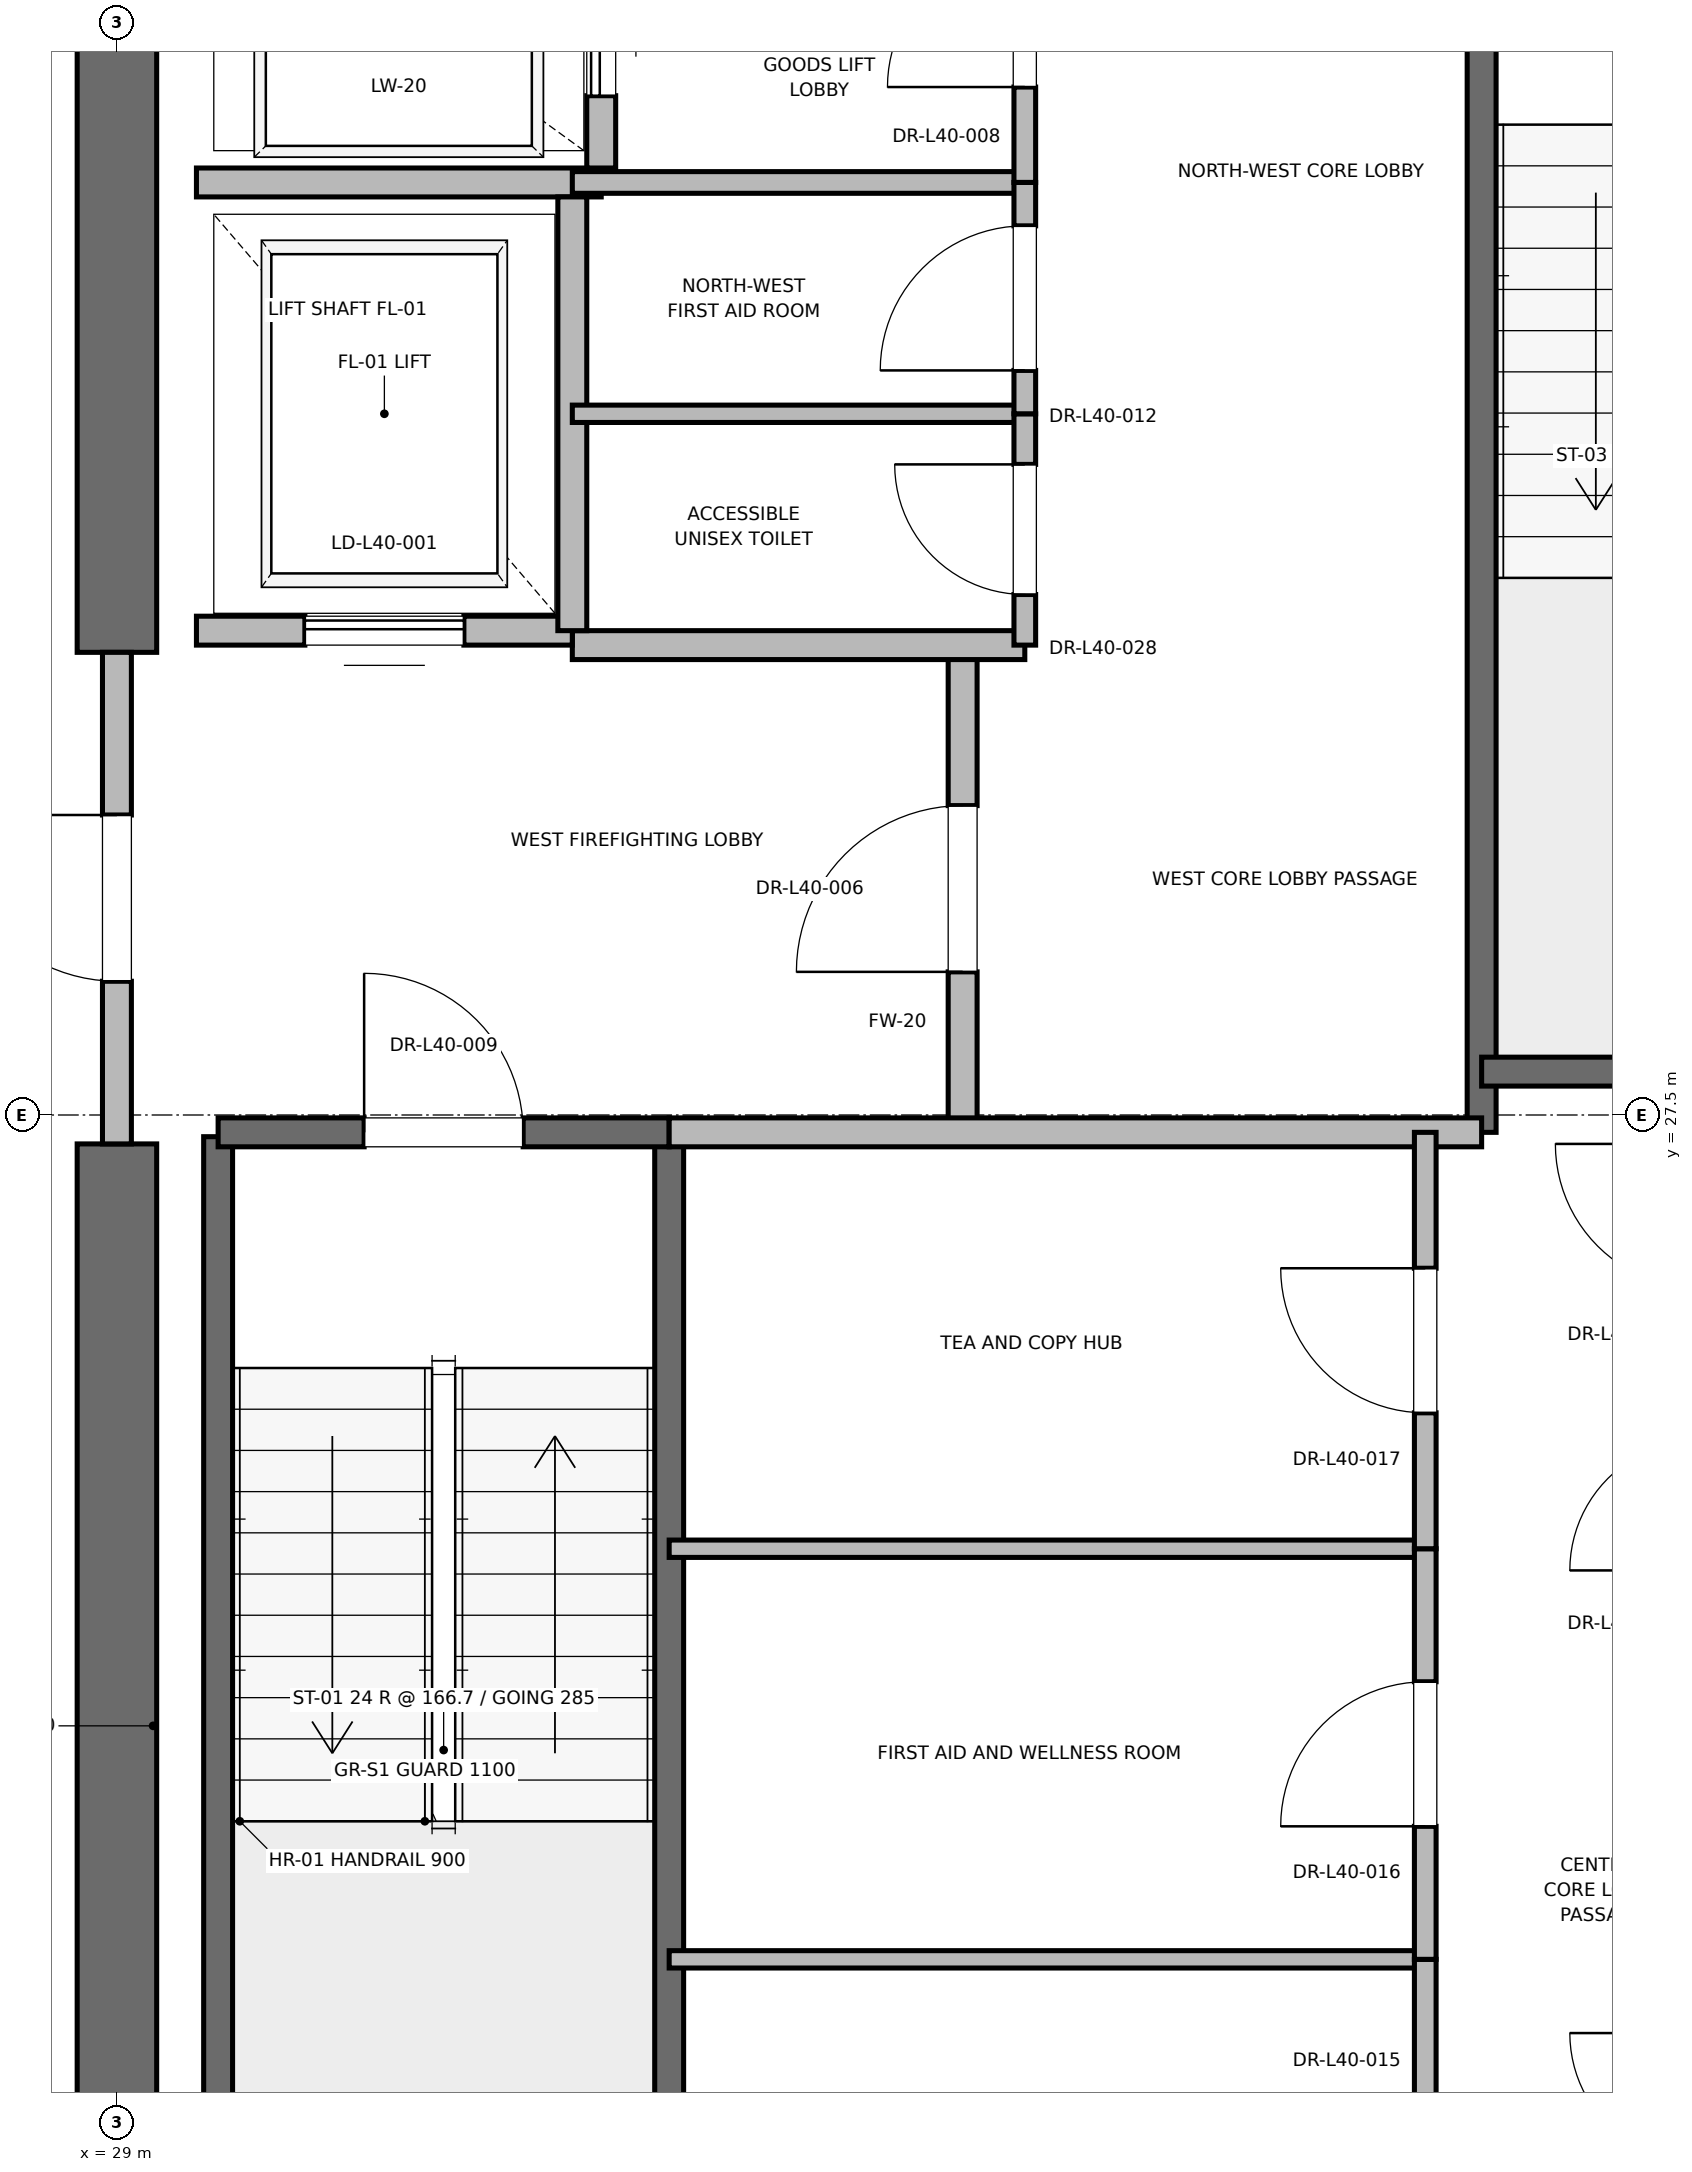
"""IFC4 building model, lengths in metres.
Left out: names, types, materials, properties, quantities, classifications, styles, units other than length and angle.
Written with IfcOpenShell. Run it as: python <this file> out.ifc"""

import sys

from ifc_helpers import new_model, si_unit, direction, frame, frame_2d, origin, place, context, subcontext, project, spatial, rectangle, extrude, element, fill, save


model = new_model("IFC4")
c1 = context("Model", 3, precision=1e-05, world=origin(), true_north=direction((0.0, 1.0)))
c2 = subcontext(c1, "Body", "Model", "MODEL_VIEW")
j1 = project(units=[si_unit("LENGTHUNIT", "METRE"), si_unit("PLANEANGLEUNIT", "RADIAN")], contexts=[c1])
p1 = place(None, origin())
s1 = spatial("IfcSite", under=j1, at=p1, CompositionType="ELEMENT")
p2 = place(p1, origin())
s2 = spatial("IfcBuilding", under=s1, at=p2, CompositionType="ELEMENT")
p3 = place(p2, frame((0.0, 0.0, 172.4)))
s3 = spatial("IfcBuildingStorey", under=s2, at=p3, CompositionType="ELEMENT", Elevation=172.4)
p4 = place(p3, frame((29.0, 18.5, 0.0), z_axis=(0.0, 0.0, 1.0), x_axis=(0.0, 1.0, 0.0)))
e1 = element("IfcWall", 1, at=p4, inside=s3, PredefinedType="SHEAR", context=c2, shape_type="SweptSolid", body=[
    extrude(rectangle(XDim=8.8, YDim=0.55, at=frame_2d((4.4, 0.0))), origin(), (0.0, 0.0, 1.0), 3.775),
])
p5 = place(p3, frame((29.0, 30.7, 0.0), z_axis=(0.0, 0.0, 1.0), x_axis=(0.0, 1.0, 0.0)))
e2 = element("IfcWall", 2, at=p5, inside=s3, PredefinedType="SHEAR", context=c2, shape_type="SweptSolid", body=[
    extrude(rectangle(XDim=5.8, YDim=0.55, at=frame_2d((2.9, 0.0))), origin(), (0.0, 0.0, 1.0), 3.775),
])
p6 = place(p3, frame((29.7, 19.2, 0.0), z_axis=(0.0, 0.0, 1.0), x_axis=(0.0, 1.0, 0.0)))
e3 = element("IfcWall", 3, at=p6, inside=s3, PredefinedType="SOLIDWALL", context=c2, shape_type="SweptSolid", body=[
    extrude(rectangle(XDim=8.15, YDim=0.2, at=frame_2d((4.075, 0.0))), origin(), (0.0, 0.0, 1.0), 3.775),
])
p7 = place(p3, frame((32.82, 18.6, 0.0), z_axis=(0.0, 0.0, 1.0), x_axis=(0.0, 1.0, 0.0)))
e4 = element("IfcWall", 4, at=p7, inside=s3, PredefinedType="SOLIDWALL", context=c2, shape_type="SweptSolid", body=[
    extrude(rectangle(XDim=8.78, YDim=0.2, at=frame_2d((4.39, 0.0))), origin(), (0.0, 0.0, 1.0), 3.775),
])
p8 = place(p3, frame((29.7, 27.38, 0.0), z_axis=(0.0, 0.0, 1.0), x_axis=(1.0, 0.0, 0.0)))
e5 = element("IfcWall", 5, at=p8, inside=s3, PredefinedType="SOLIDWALL", context=c2, shape_type="SweptSolid", body=[
    extrude(rectangle(XDim=3.12, YDim=0.2, at=frame_2d((1.56, 0.0))), origin(), (0.0, 0.0, 1.0), 3.775),
])
p9 = place(p8, frame((1.01, 0.0, 0.0)))
e6 = element("IfcOpeningElement", 6, at=p9, cuts=e5, PredefinedType="OPENING", context=c2, shape_type="SweptSolid", body=[
    extrude(rectangle(XDim=1.1, YDim=2.15, at=frame_2d((0.55, 1.075))), frame((0.0, 0.1, 0.0), z_axis=(0.0, -1.0, 0.0), x_axis=(1.0, 0.0, 0.0)), (0.0, 0.0, 1.0), 0.2),
])
p10 = place(p3, frame((38.44, 27.38, 0.0), z_axis=(0.0, 0.0, 1.0), x_axis=(0.0, 1.0, 0.0)))
e7 = element("IfcWall", 7, at=p10, inside=s3, PredefinedType="SOLIDWALL", context=c2, shape_type="SweptSolid", body=[
    extrude(rectangle(XDim=8.87, YDim=0.2, at=frame_2d((4.435, 0.0))), origin(), (0.0, 0.0, 1.0), 3.775),
])
p11 = place(p3, frame((38.44, 27.8, 0.0), z_axis=(0.0, 0.0, 1.0), x_axis=(1.0, 0.0, 0.0)))
e8 = element("IfcWall", 8, at=p11, inside=s3, PredefinedType="SOLIDWALL", context=c2, shape_type="SweptSolid", body=[
    extrude(rectangle(XDim=3.32, YDim=0.2, at=frame_2d((1.66, 0.0))), origin(), (0.0, 0.0, 1.0), 3.775),
])
p12 = place(p3, frame((34.85, 27.38, 0.0), z_axis=(0.0, 0.0, 1.0), x_axis=(0.0, 1.0, 0.0)))
e9 = element("IfcWall", 9, at=p12, inside=s3, PredefinedType="PARTITIONING", context=c2, shape_type="SweptSolid", body=[
    extrude(rectangle(XDim=3.37, YDim=0.2, at=frame_2d((1.685, 0.0))), origin(), (0.0, 0.0, 1.0), 3.775),
])
p13 = place(p12, frame((1.11, 0.0, 0.0)))
e10 = element("IfcOpeningElement", 10, at=p13, cuts=e9, PredefinedType="OPENING", context=c2, shape_type="SweptSolid", body=[
    extrude(rectangle(XDim=1.15, YDim=2.2, at=frame_2d((0.575, 1.1))), frame((0.0, 0.1, 0.0), z_axis=(0.0, -1.0, 0.0), x_axis=(1.0, 0.0, 0.0)), (0.0, 0.0, 1.0), 0.2),
])
p14 = place(p3, frame((29.0, 27.3, 0.0), z_axis=(0.0, 0.0, 1.0), x_axis=(0.0, 1.0, 0.0)))
e11 = element("IfcWall", 11, at=p14, inside=s3, PredefinedType="PARTITIONING", context=c2, shape_type="SweptSolid", body=[
    extrude(rectangle(XDim=3.4, YDim=0.2, at=frame_2d((1.7, 0.0))), origin(), (0.0, 0.0, 1.0), 2.755),
])
p15 = place(p14, frame((1.125, 0.0, 0.0)))
e12 = element("IfcOpeningElement", 12, at=p15, cuts=e11, PredefinedType="OPENING", context=c2, shape_type="SweptSolid", body=[
    extrude(rectangle(XDim=1.15, YDim=2.2, at=frame_2d((0.575, 1.1))), frame((0.0, 0.1, 0.0), z_axis=(0.0, -1.0, 0.0), x_axis=(1.0, 0.0, 0.0)), (0.0, 0.0, 1.0), 0.2),
])
p16 = place(p3, frame((32.82, 27.38, 0.0), z_axis=(0.0, 0.0, 1.0), x_axis=(1.0, 0.0, 0.0)))
e13 = element("IfcWall", 13, at=p16, inside=s3, PredefinedType="PARTITIONING", context=c2, shape_type="SweptSolid", body=[
    extrude(rectangle(XDim=5.62, YDim=0.2, at=frame_2d((2.81, 0.0))), origin(), (0.0, 0.0, 1.0), 3.775),
])
p17 = place(p3, frame((32.15, 30.75, 0.0), z_axis=(0.0, 0.0, 1.0), x_axis=(1.0, 0.0, 0.0)))
e14 = element("IfcWall", 14, at=p17, inside=s3, PredefinedType="PARTITIONING", context=c2, shape_type="SweptSolid", body=[
    extrude(rectangle(XDim=3.13, YDim=0.2, at=frame_2d((1.565, 0.0))), origin(), (0.0, 0.0, 1.0), 3.775),
])
p18 = place(p3, frame((29.55, 30.85, 0.0), z_axis=(0.0, 0.0, 1.0), x_axis=(1.0, 0.0, 0.0)))
e15 = element("IfcWall", 15, at=p18, inside=s3, PredefinedType="SOLIDWALL", context=c2, shape_type="SweptSolid", body=[
    extrude(rectangle(XDim=2.6, YDim=0.2, at=frame_2d((1.3, 0.0))), origin(), (0.0, 0.0, 1.0), 2.755),
])
p19 = place(p18, frame((0.75, 0.0, 0.0)))
e16 = element("IfcOpeningElement", 16, at=p19, cuts=e15, PredefinedType="OPENING", context=c2, shape_type="SweptSolid", body=[
    extrude(rectangle(XDim=1.1, YDim=2.2, at=frame_2d((0.55, 1.1))), frame((0.0, 0.1, 0.0), z_axis=(0.0, -1.0, 0.0), x_axis=(1.0, 0.0, 0.0)), (0.0, 0.0, 1.0), 0.2),
])
p20 = place(p3, frame((29.55, 33.95, 0.0), z_axis=(0.0, 0.0, 1.0), x_axis=(1.0, 0.0, 0.0)))
e17 = element("IfcWall", 17, at=p20, inside=s3, PredefinedType="SOLIDWALL", context=c2, shape_type="SweptSolid", body=[
    extrude(rectangle(XDim=2.8, YDim=0.2, at=frame_2d((1.4, 0.0))), origin(), (0.0, 0.0, 1.0), 3.775),
])
p21 = place(p3, frame((32.15, 30.85, 0.0), z_axis=(0.0, 0.0, 1.0), x_axis=(0.0, 1.0, 0.0)))
e18 = element("IfcWall", 18, at=p21, inside=s3, PredefinedType="SOLIDWALL", context=c2, shape_type="SweptSolid", body=[
    extrude(rectangle(XDim=3.0, YDim=0.2, at=frame_2d((1.5, 0.0))), origin(), (0.0, 0.0, 1.0), 3.775),
])
p22 = place(p3, frame((32.35, 34.05, 0.0), z_axis=(0.0, 0.0, 1.0), x_axis=(0.0, 1.0, 0.0)))
e19 = element("IfcWall", 19, at=p22, inside=s3, PredefinedType="SOLIDWALL", context=c2, shape_type="SweptSolid", body=[
    extrude(rectangle(XDim=2.1, YDim=0.2, at=frame_2d((1.05, 0.0))), origin(), (0.0, 0.0, 1.0), 3.775),
])
p23 = place(p22, frame((0.5, 0.0, 0.0)))
e20 = element("IfcOpeningElement", 20, at=p23, cuts=e19, PredefinedType="OPENING", context=c2, shape_type="SweptSolid", body=[
    extrude(rectangle(XDim=1.1, YDim=2.2, at=frame_2d((0.55, 1.1))), frame((0.0, 0.1, 0.0), z_axis=(0.0, -1.0, 0.0), x_axis=(1.0, 0.0, 0.0)), (0.0, 0.0, 1.0), 0.2),
])
p24 = place(p3, frame((32.15, 33.95, 0.0), z_axis=(0.0, 0.0, 1.0), x_axis=(1.0, 0.0, 0.0)))
e21 = element("IfcWall", 21, at=p24, inside=s3, PredefinedType="PARTITIONING", context=c2, shape_type="SweptSolid", body=[
    extrude(rectangle(XDim=3.13, YDim=0.15, at=frame_2d((1.565, 0.0))), origin(), (0.0, 0.0, 1.0), 2.85),
])
p25 = place(p3, frame((35.28, 33.95, 0.0), z_axis=(0.0, 0.0, 1.0), x_axis=(0.0, 1.0, 0.0)))
e22 = element("IfcWall", 22, at=p25, inside=s3, PredefinedType="PARTITIONING", context=c2, shape_type="SweptSolid", body=[
    extrude(rectangle(XDim=2.27, YDim=0.15, at=frame_2d((1.135, 0.0))), origin(), (0.0, 0.0, 1.0), 2.755),
])
p26 = place(p25, frame((0.66, 0.0, 0.0)))
e23 = element("IfcOpeningElement", 23, at=p26, cuts=e22, PredefinedType="OPENING", context=c2, shape_type="SweptSolid", body=[
    extrude(rectangle(XDim=0.95, YDim=2.15, at=frame_2d((0.475, 1.075))), frame((0.0, 0.075, 0.0), z_axis=(0.0, -1.0, 0.0), x_axis=(1.0, 0.0, 0.0)), (0.0, 0.0, 1.0), 0.15),
])
p27 = place(p3, frame((32.15, 32.35, 0.0), z_axis=(0.0, 0.0, 1.0), x_axis=(1.0, 0.0, 0.0)))
e24 = element("IfcWall", 24, at=p27, inside=s3, PredefinedType="PARTITIONING", context=c2, shape_type="SweptSolid", body=[
    extrude(rectangle(XDim=3.13, YDim=0.12, at=frame_2d((1.565, 0.0))), origin(), (0.0, 0.0, 1.0), 2.85),
])
p28 = place(p3, frame((35.28, 30.75, 0.0), z_axis=(0.0, 0.0, 1.0), x_axis=(0.0, 1.0, 0.0)))
e25 = element("IfcWall", 25, at=p28, inside=s3, PredefinedType="PARTITIONING", context=c2, shape_type="SweptSolid", body=[
    extrude(rectangle(XDim=1.6, YDim=0.15, at=frame_2d((0.8, 0.0))), origin(), (0.0, 0.0, 1.0), 2.85),
])
p29 = place(p28, frame((0.35, 0.0, 0.0)))
e26 = element("IfcOpeningElement", 26, at=p29, cuts=e25, PredefinedType="OPENING", context=c2, shape_type="SweptSolid", body=[
    extrude(rectangle(XDim=0.9, YDim=2.1, at=frame_2d((0.45, 1.05))), frame((0.0, 0.075, 0.0), z_axis=(0.0, -1.0, 0.0), x_axis=(1.0, 0.0, 0.0)), (0.0, 0.0, 1.0), 0.15),
])
p30 = place(p3, frame((35.28, 32.35, 0.0), z_axis=(0.0, 0.0, 1.0), x_axis=(0.0, 1.0, 0.0)))
e27 = element("IfcWall", 27, at=p30, inside=s3, PredefinedType="PARTITIONING", context=c2, shape_type="SweptSolid", body=[
    extrude(rectangle(XDim=1.6, YDim=0.15, at=frame_2d((0.8, 0.0))), origin(), (0.0, 0.0, 1.0), 2.85),
])
p31 = place(p30, frame((0.3, 0.0, 0.0)))
e28 = element("IfcOpeningElement", 28, at=p31, cuts=e27, PredefinedType="OPENING", context=c2, shape_type="SweptSolid", body=[
    extrude(rectangle(XDim=1.0, YDim=2.15, at=frame_2d((0.5, 1.075))), frame((0.0, 0.075, 0.0), z_axis=(0.0, -1.0, 0.0), x_axis=(1.0, 0.0, 0.0)), (0.0, 0.0, 1.0), 0.15),
])
for number, where, z_axis, x_axis in (
    (29, (32.82, 21.66, 0.0), (0.0, 0.0, 1.0), (1.0, 0.0, 0.0)),
    (30, (32.82, 24.5, 0.0), (0.0, 0.0, 1.0), (1.0, 0.0, 0.0)),
):
    element("IfcWall", number, at=place(p3, frame(where, z_axis=z_axis, x_axis=x_axis)), inside=s3, PredefinedType="PARTITIONING", context=c2, shape_type="SweptSolid", body=[
        extrude(rectangle(XDim=5.23, YDim=0.12, at=frame_2d((2.615, 0.0))), origin(), (0.0, 0.0, 1.0), 2.85),
    ])
p32 = place(p3, frame((38.05, 18.6, 0.0), z_axis=(0.0, 0.0, 1.0), x_axis=(0.0, 1.0, 0.0)))
e31 = element("IfcWall", 31, at=p32, inside=s3, PredefinedType="PARTITIONING", context=c2, shape_type="SweptSolid", body=[
    extrude(rectangle(XDim=3.06, YDim=0.15, at=frame_2d((1.53, 0.0))), origin(), (0.0, 0.0, 1.0), 2.755),
])
p33 = place(p32, frame((1.03, 0.0, 0.0)))
e32 = element("IfcOpeningElement", 32, at=p33, cuts=e31, PredefinedType="OPENING", context=c2, shape_type="SweptSolid", body=[
    extrude(rectangle(XDim=1.0, YDim=2.15, at=frame_2d((0.5, 1.075))), frame((0.0, 0.075, 0.0), z_axis=(0.0, -1.0, 0.0), x_axis=(1.0, 0.0, 0.0)), (0.0, 0.0, 1.0), 0.15),
])
p34 = place(p3, frame((38.05, 21.66, 0.0), z_axis=(0.0, 0.0, 1.0), x_axis=(0.0, 1.0, 0.0)))
e33 = element("IfcWall", 33, at=p34, inside=s3, PredefinedType="PARTITIONING", context=c2, shape_type="SweptSolid", body=[
    extrude(rectangle(XDim=2.84, YDim=0.15, at=frame_2d((1.42, 0.0))), origin(), (0.0, 0.0, 1.0), 2.85),
])
p35 = place(p34, frame((0.92, 0.0, 0.0)))
e34 = element("IfcOpeningElement", 34, at=p35, cuts=e33, PredefinedType="OPENING", context=c2, shape_type="SweptSolid", body=[
    extrude(rectangle(XDim=1.0, YDim=2.15, at=frame_2d((0.5, 1.075))), frame((0.0, 0.075, 0.0), z_axis=(0.0, -1.0, 0.0), x_axis=(1.0, 0.0, 0.0)), (0.0, 0.0, 1.0), 0.15),
])
p36 = place(p3, frame((38.05, 24.5, 0.0), z_axis=(0.0, 0.0, 1.0), x_axis=(0.0, 1.0, 0.0)))
e35 = element("IfcWall", 35, at=p36, inside=s3, PredefinedType="PARTITIONING", context=c2, shape_type="SweptSolid", body=[
    extrude(rectangle(XDim=2.88, YDim=0.15, at=frame_2d((1.44, 0.0))), origin(), (0.0, 0.0, 1.0), 2.85),
])
p37 = place(p36, frame((0.94, 0.0, 0.0)))
e36 = element("IfcOpeningElement", 36, at=p37, cuts=e35, PredefinedType="OPENING", context=c2, shape_type="SweptSolid", body=[
    extrude(rectangle(XDim=1.0, YDim=2.15, at=frame_2d((0.5, 1.075))), frame((0.0, 0.075, 0.0), z_axis=(0.0, -1.0, 0.0), x_axis=(1.0, 0.0, 0.0)), (0.0, 0.0, 1.0), 0.15),
])
p38 = place(p9, origin())
e37 = element("IfcDoor", 37, at=p38, inside=s3, OperationType="SINGLE_SWING_LEFT", PredefinedType="DOOR", context=c2, shape_type="SweptSolid", body=[
    extrude(rectangle(XDim=1.1, YDim=2.15, at=frame_2d((0.55, 1.075))), frame((0.0, 0.025, 0.0), z_axis=(0.0, -1.0, 0.0), x_axis=(1.0, 0.0, 0.0)), (0.0, 0.0, 1.0), 0.05),
])
fill(e6, e37)
p39 = place(p13, origin())
e38 = element("IfcDoor", 38, at=p39, inside=s3, OperationType="SINGLE_SWING_LEFT", PredefinedType="DOOR", context=c2, shape_type="SweptSolid", body=[
    extrude(rectangle(XDim=1.15, YDim=2.2, at=frame_2d((0.575, 1.1))), frame((0.0, 0.025, 0.0), z_axis=(0.0, -1.0, 0.0), x_axis=(1.0, 0.0, 0.0)), (0.0, 0.0, 1.0), 0.05),
])
fill(e10, e38)
p40 = place(p15, origin())
e39 = element("IfcDoor", 39, at=p40, inside=s3, OperationType="SINGLE_SWING_RIGHT", PredefinedType="DOOR", context=c2, shape_type="SweptSolid", body=[
    extrude(rectangle(XDim=1.15, YDim=2.2, at=frame_2d((0.575, 1.1))), frame((0.0, 0.025, 0.0), z_axis=(0.0, -1.0, 0.0), x_axis=(1.0, 0.0, 0.0)), (0.0, 0.0, 1.0), 0.05),
])
fill(e12, e39)
p41 = place(p19, origin())
e40 = element("IfcDoor", 40, at=p41, inside=s3, OperationType="SLIDING_TO_RIGHT", PredefinedType="DOOR", context=c2, shape_type="SweptSolid", body=[
    extrude(rectangle(XDim=1.1, YDim=2.2, at=frame_2d((0.55, 1.1))), frame((0.0, 0.025, 0.0), z_axis=(0.0, -1.0, 0.0), x_axis=(1.0, 0.0, 0.0)), (0.0, 0.0, 1.0), 0.05),
])
fill(e16, e40)
p42 = place(p23, origin())
e41 = element("IfcDoor", 41, at=p42, inside=s3, OperationType="SLIDING_TO_RIGHT", PredefinedType="DOOR", context=c2, shape_type="SweptSolid", body=[
    extrude(rectangle(XDim=1.1, YDim=2.2, at=frame_2d((0.55, 1.1))), frame((0.0, 0.025, 0.0), z_axis=(0.0, -1.0, 0.0), x_axis=(1.0, 0.0, 0.0)), (0.0, 0.0, 1.0), 0.05),
])
fill(e20, e41)
p43 = place(p26, origin())
e42 = element("IfcDoor", 42, at=p43, inside=s3, OperationType="SINGLE_SWING_LEFT", PredefinedType="DOOR", context=c2, shape_type="SweptSolid", body=[
    extrude(rectangle(XDim=0.95, YDim=2.15, at=frame_2d((0.475, 1.075))), frame((0.0, 0.025, 0.0), z_axis=(0.0, -1.0, 0.0), x_axis=(1.0, 0.0, 0.0)), (0.0, 0.0, 1.0), 0.05),
])
fill(e23, e42)
p44 = place(p29, origin())
e43 = element("IfcDoor", 43, at=p44, inside=s3, OperationType="SINGLE_SWING_RIGHT", PredefinedType="DOOR", context=c2, shape_type="SweptSolid", body=[
    extrude(rectangle(XDim=0.9, YDim=2.1, at=frame_2d((0.45, 1.05))), frame((0.0, 0.025, 0.0), z_axis=(0.0, -1.0, 0.0), x_axis=(1.0, 0.0, 0.0)), (0.0, 0.0, 1.0), 0.05),
])
fill(e26, e43)
p45 = place(p31, origin())
e44 = element("IfcDoor", 44, at=p45, inside=s3, OperationType="SINGLE_SWING_LEFT", PredefinedType="DOOR", context=c2, shape_type="SweptSolid", body=[
    extrude(rectangle(XDim=1.0, YDim=2.15, at=frame_2d((0.5, 1.075))), frame((0.0, 0.025, 0.0), z_axis=(0.0, -1.0, 0.0), x_axis=(1.0, 0.0, 0.0)), (0.0, 0.0, 1.0), 0.05),
])
fill(e28, e44)
p46 = place(p35, origin())
e45 = element("IfcDoor", 45, at=p46, inside=s3, OperationType="SINGLE_SWING_LEFT", PredefinedType="DOOR", context=c2, shape_type="SweptSolid", body=[
    extrude(rectangle(XDim=1.0, YDim=2.15, at=frame_2d((0.5, 1.075))), frame((0.0, 0.025, 0.0), z_axis=(0.0, -1.0, 0.0), x_axis=(1.0, 0.0, 0.0)), (0.0, 0.0, 1.0), 0.05),
])
fill(e34, e45)
p47 = place(p37, origin())
e46 = element("IfcDoor", 46, at=p47, inside=s3, OperationType="SINGLE_SWING_RIGHT", PredefinedType="DOOR", context=c2, shape_type="SweptSolid", body=[
    extrude(rectangle(XDim=1.0, YDim=2.15, at=frame_2d((0.5, 1.075))), frame((0.0, 0.025, 0.0), z_axis=(0.0, -1.0, 0.0), x_axis=(1.0, 0.0, 0.0)), (0.0, 0.0, 1.0), 0.05),
])
fill(e36, e46)
save(model, sys.argv[1])
